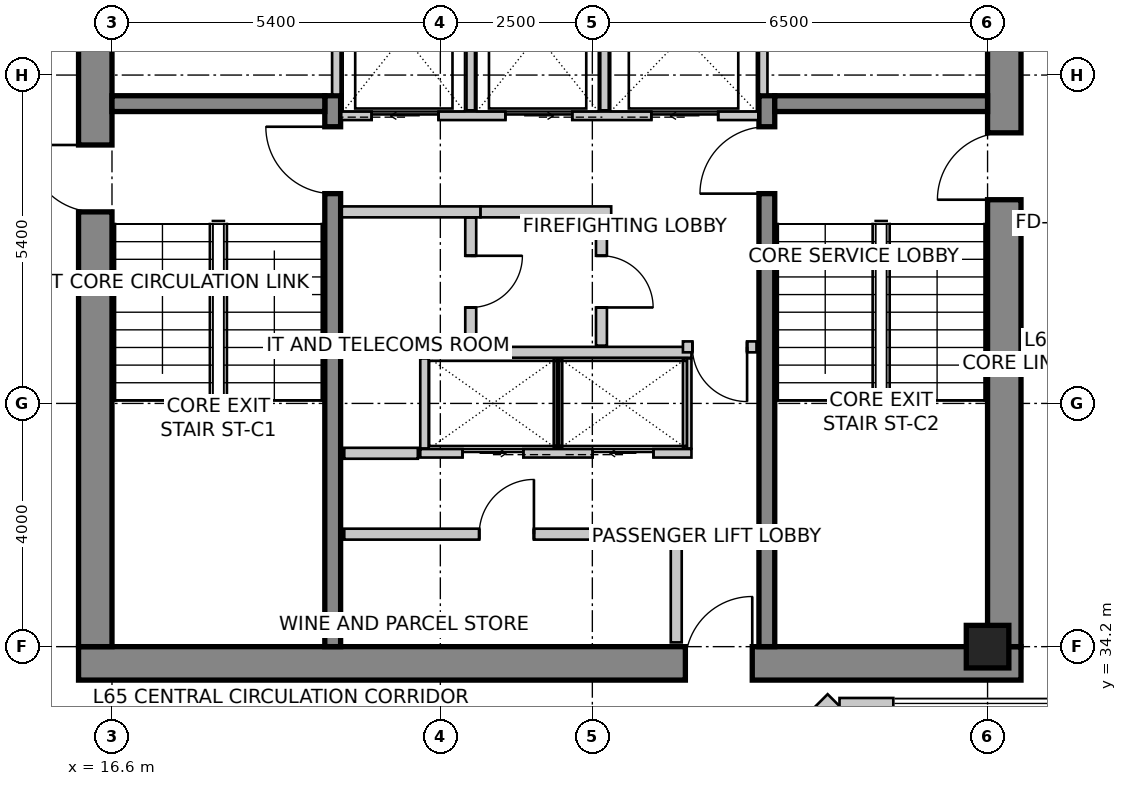
"""IFC4 building model, lengths in metres.
Left out: names, types, materials, properties, quantities, classifications, styles, units other than length and angle.
Written with IfcOpenShell. Run it as: python <this file> out.ifc"""

import sys

from ifc_helpers import new_model, si_unit, direction, frame, frame_2d, origin, origin_2d, place, context, subcontext, project, spatial, rectangle, extrude, source, transform, mapped, element, fill, save


model = new_model("IFC4")
c1 = context("Model", 3, precision=1e-05, world=origin(), true_north=direction((0.0, 1.0)))
c2 = subcontext(c1, "Body", "Model", "MODEL_VIEW")
j1 = project(units=[si_unit("LENGTHUNIT", "METRE"), si_unit("PLANEANGLEUNIT", "RADIAN")], contexts=[c1])
p1 = place(None, origin())
s1 = spatial("IfcSite", under=j1, at=p1, CompositionType="ELEMENT")
p2 = place(p1, origin())
s2 = spatial("IfcBuilding", under=s1, at=p2, CompositionType="ELEMENT")
p3 = place(p2, frame((0.0, 0.0, 256.5)))
s3 = spatial("IfcBuildingStorey", under=s2, at=p3, CompositionType="ELEMENT", Elevation=256.5)
p4 = place(p3, frame((16.05, 33.925, 0.0), z_axis=(0.0, 0.0, 1.0), x_axis=(1.0, 0.0, 0.0)))
e1 = element("IfcWall", 1, at=p4, inside=s3, PredefinedType="SHEAR", context=c2, shape_type="SweptSolid", body=[
    extrude(rectangle(XDim=15.5, YDim=0.55, at=frame_2d((7.75, 0.0))), origin(), (0.0, 0.0, 1.0), 3.6),
])
m1 = source(origin(), c2, "Body", "SweptSolid", [
    extrude(rectangle(XDim=1.1, YDim=2.15, at=frame_2d((0.55, 1.075))), frame((0.0, 0.285, 0.0), z_axis=(0.0, -1.0, 0.0), x_axis=(1.0, 0.0, 0.0)), (0.0, 0.0, 1.0), 0.57),
])
p5 = place(p4, frame((9.98, 0.0, 0.0)))
e2 = element("IfcOpeningElement", 2, at=p5, cuts=e1, PredefinedType="OPENING", context=c2, shape_type="MappedRepresentation", body=[
    mapped(m1, transform((0.0, 0.0, 0.0), scale=1.0)),
])
p6 = place(p3, frame((16.325, 34.2, 0.0), z_axis=(0.0, 0.0, 1.0), x_axis=(0.0, 1.0, 0.0)))
e3 = element("IfcWall", 3, at=p6, inside=s3, PredefinedType="SHEAR", context=c2, shape_type="SweptSolid", body=[
    extrude(rectangle(XDim=11.4, YDim=0.55, at=frame_2d((5.7, 0.0))), origin(), (0.0, 0.0, 1.0), 3.6),
])
p7 = place(p6, frame((7.15, 0.0, 0.0)))
e4 = element("IfcOpeningElement", 4, at=p7, cuts=e3, PredefinedType="OPENING", context=c2, shape_type="MappedRepresentation", body=[
    mapped(m1, transform((0.0, 0.0, 0.0), scale=1.0)),
])
p8 = place(p3, frame((31.275, 34.2, 0.0), z_axis=(0.0, 0.0, 1.0), x_axis=(0.0, 1.0, 0.0)))
e5 = element("IfcWall", 5, at=p8, inside=s3, PredefinedType="SHEAR", context=c2, shape_type="SweptSolid", body=[
    extrude(rectangle(XDim=11.4, YDim=0.55, at=frame_2d((5.7, 0.0))), origin(), (0.0, 0.0, 1.0), 3.6),
])
p9 = place(p8, frame((7.35, 0.0, 0.0)))
e6 = element("IfcOpeningElement", 6, at=p9, cuts=e5, PredefinedType="OPENING", context=c2, shape_type="MappedRepresentation", body=[
    mapped(m1, transform((0.0, 0.0, 0.0), scale=1.0)),
])
p10 = place(p3, frame((20.23, 34.2, 0.0), z_axis=(0.0, 0.0, 1.0), x_axis=(0.0, 1.0, 0.0)))
e7 = element("IfcWall", 7, at=p10, inside=s3, PredefinedType="SHEAR", context=c2, shape_type="SweptSolid", body=[
    extrude(rectangle(XDim=9.06, YDim=0.26, at=frame_2d((4.53, 0.0))), origin(), (0.0, 0.0, 1.0), 3.6),
])
m2 = source(origin(), c2, "Body", "SweptSolid", [
    extrude(rectangle(XDim=1.1, YDim=2.15, at=frame_2d((0.55, 1.075))), frame((0.0, 0.14, 0.0), z_axis=(0.0, -1.0, 0.0), x_axis=(1.0, 0.0, 0.0)), (0.0, 0.0, 1.0), 0.28),
])
p11 = place(p10, frame((7.45, 0.0, 0.0)))
e8 = element("IfcOpeningElement", 8, at=p11, cuts=e7, PredefinedType="OPENING", context=c2, shape_type="MappedRepresentation", body=[
    mapped(m2, transform((0.0, 0.0, 0.0), scale=1.0)),
])
p12 = place(p3, frame((27.37, 34.2, 0.0), z_axis=(0.0, 0.0, 1.0), x_axis=(0.0, 1.0, 0.0)))
e9 = element("IfcWall", 9, at=p12, inside=s3, PredefinedType="SHEAR", context=c2, shape_type="SweptSolid", body=[
    extrude(rectangle(XDim=9.06, YDim=0.26, at=frame_2d((4.53, 0.0))), origin(), (0.0, 0.0, 1.0), 3.6),
])
p13 = place(p12, frame((7.45, 0.0, 0.0)))
e10 = element("IfcOpeningElement", 10, at=p13, cuts=e9, PredefinedType="OPENING", context=c2, shape_type="MappedRepresentation", body=[
    mapped(m2, transform((0.0, 0.0, 0.0), scale=1.0)),
])
for number, where, z_axis, x_axis in (
    (11, (16.6, 43.13, 0.0), (0.0, 0.0, 1.0), (1.0, 0.0, 0.0)),
    (12, (27.5, 43.13, 0.0), (0.0, 0.0, 1.0), (1.0, 0.0, 0.0)),
):
    element("IfcWall", number, at=place(p3, frame(where, z_axis=z_axis, x_axis=x_axis)), inside=s3, PredefinedType="SHEAR", context=c2, shape_type="SweptSolid", body=[
        extrude(rectangle(XDim=3.5, YDim=0.26, at=frame_2d((1.75, 0.0))), origin(), (0.0, 0.0, 1.0), 3.6),
    ])
m3 = source(origin(), c2, "Body", "SweptSolid", [
    extrude(rectangle(XDim=0.7, YDim=0.7, at=origin_2d()), origin(), (0.0, 0.0, 1.0), 3.6),
])
p14 = place(p3, frame((31.0, 34.2, 0.0), z_axis=(0.0, 0.0, 1.0), x_axis=(1.0, 0.0, 0.0)))
e13 = element("IfcColumn", 13, at=p14, inside=s3, PredefinedType="COLUMN", context=c2, shape_type="MappedRepresentation", body=[
    mapped(m3, transform((0.0, 0.0, 0.0), scale=1.0)),
])
p15 = place(p3, frame((26.42, 31.256, 0.0), z_axis=(0.0, 0.0, 1.0), x_axis=(0.707106781187, 0.707106781187, 0.0)))
e14 = element("IfcWall", 14, at=p15, inside=s3, PredefinedType="SOLIDWALL", context=c2, shape_type="SweptSolid", body=[
    extrude(rectangle(XDim=2.907, YDim=0.3, at=frame_2d((1.454, 0.0))), origin(), (0.0, 0.0, 1.0), 3.35),
])
m4 = source(origin(), c2, "Body", "SweptSolid", [
    extrude(rectangle(XDim=2.1, YDim=2.0, at=frame_2d((1.05, 1.0))), frame((0.0, 0.16, 0.0), z_axis=(0.0, -1.0, 0.0), x_axis=(1.0, 0.0, 0.0)), (0.0, 0.0, 1.0), 0.32),
])
p16 = place(p15, frame((0.404, 0.0, 0.85)))
e15 = element("IfcOpeningElement", 15, at=p16, cuts=e14, PredefinedType="OPENING", context=c2, shape_type="MappedRepresentation", body=[
    mapped(m4, transform((0.0, 0.0, 0.0), scale=1.0)),
])
p17 = place(p3, frame((28.565, 33.206, 0.0), z_axis=(0.0, 0.0, 1.0), x_axis=(1.0, 0.0, 0.0)))
e16 = element("IfcWall", 16, at=p17, inside=s3, PredefinedType="SOLIDWALL", context=c2, shape_type="SweptSolid", body=[
    extrude(rectangle(XDim=0.885, YDim=0.3, at=frame_2d((0.442, 0.0))), origin(), (0.0, 0.0, 1.0), 3.35),
])
p18 = place(p3, frame((20.37, 42.93, 0.0), z_axis=(0.0, 0.0, 1.0), x_axis=(1.0, 0.0, 0.0)))
e17 = element("IfcWall", 17, at=p18, inside=s3, PredefinedType="SOLIDWALL", context=c2, shape_type="SweptSolid", body=[
    extrude(rectangle(XDim=6.86, YDim=0.14, at=frame_2d((3.43, 0.0))), origin(), (0.0, 0.0, 1.0), 3.35),
])
m5 = source(origin(), c2, "Body", "SweptSolid", [
    extrude(rectangle(XDim=1.1, YDim=2.15, at=frame_2d((0.55, 1.075))), frame((0.0, 0.08, 0.0), z_axis=(0.0, -1.0, 0.0), x_axis=(1.0, 0.0, 0.0)), (0.0, 0.0, 1.0), 0.16),
])
p19 = place(p18, frame((0.5, 0.0, 0.0)))
e18 = element("IfcOpeningElement", 18, at=p19, cuts=e17, PredefinedType="OPENING", context=c2, shape_type="MappedRepresentation", body=[
    mapped(m5, transform((0.0, 0.0, 0.0), scale=1.0)),
])
p20 = place(p18, frame((2.7, 0.0, 0.0)))
e19 = element("IfcOpeningElement", 19, at=p20, cuts=e17, PredefinedType="OPENING", context=c2, shape_type="MappedRepresentation", body=[
    mapped(m5, transform((0.0, 0.0, 0.0), scale=1.0)),
])
p21 = place(p18, frame((5.1, 0.0, 0.0)))
e20 = element("IfcOpeningElement", 20, at=p21, cuts=e17, PredefinedType="OPENING", context=c2, shape_type="MappedRepresentation", body=[
    mapped(m5, transform((0.0, 0.0, 0.0), scale=1.0)),
])
for number, where, z_axis, x_axis in (
    (21, (20.29, 43.28, 0.0), (0.0, 0.0, 1.0), (0.0, 1.0, 0.0)),
    (22, (27.31, 43.28, 0.0), (0.0, 0.0, 1.0), (0.0, 1.0, 0.0)),
):
    element("IfcWall", number, at=place(p3, frame(where, z_axis=z_axis, x_axis=x_axis)), inside=s3, PredefinedType="SOLIDWALL", context=c2, shape_type="SweptSolid", body=[
        extrude(rectangle(XDim=2.3, YDim=0.14, at=frame_2d((1.15, 0.0))), origin(), (0.0, 0.0, 1.0), 3.35),
    ])
for number, where, z_axis, x_axis in (
    (23, (22.5, 43.02, 0.0), (0.0, 0.0, 1.0), (0.0, 1.0, 0.0)),
    (24, (24.7, 43.02, 0.0), (0.0, 0.0, 1.0), (0.0, 1.0, 0.0)),
):
    element("IfcWall", number, at=place(p3, frame(where, z_axis=z_axis, x_axis=x_axis)), inside=s3, PredefinedType="SOLIDWALL", context=c2, shape_type="SweptSolid", body=[
        extrude(rectangle(XDim=2.56, YDim=0.14, at=frame_2d((1.28, 0.0))), origin(), (0.0, 0.0, 1.0), 3.35),
    ])
p22 = place(p3, frame((21.67, 37.38, 0.0), z_axis=(0.0, 0.0, 1.0), x_axis=(1.0, 0.0, 0.0)))
e25 = element("IfcWall", 25, at=p22, inside=s3, PredefinedType="SOLIDWALL", context=c2, shape_type="SweptSolid", body=[
    extrude(rectangle(XDim=4.46, YDim=0.14, at=frame_2d((2.23, 0.0))), origin(), (0.0, 0.0, 1.0), 3.35),
])
m6 = source(origin(), c2, "Body", "SweptSolid", [
    extrude(rectangle(XDim=1.0, YDim=2.15, at=frame_2d((0.5, 1.075))), frame((0.0, 0.08, 0.0), z_axis=(0.0, -1.0, 0.0), x_axis=(1.0, 0.0, 0.0)), (0.0, 0.0, 1.0), 0.16),
])
p23 = place(p22, frame((0.695, 0.0, 0.0)))
e26 = element("IfcOpeningElement", 26, at=p23, cuts=e25, PredefinedType="OPENING", context=c2, shape_type="MappedRepresentation", body=[
    mapped(m6, transform((0.0, 0.0, 0.0), scale=1.0)),
])
p24 = place(p22, frame((2.835, 0.0, 0.0)))
e27 = element("IfcOpeningElement", 27, at=p24, cuts=e25, PredefinedType="OPENING", context=c2, shape_type="MappedRepresentation", body=[
    mapped(m6, transform((0.0, 0.0, 0.0), scale=1.0)),
])
p25 = place(p3, frame((21.67, 39.04, 0.0), z_axis=(0.0, 0.0, 1.0), x_axis=(1.0, 0.0, 0.0)))
e28 = element("IfcWall", 28, at=p25, inside=s3, PredefinedType="SOLIDWALL", context=c2, shape_type="SweptSolid", body=[
    extrude(rectangle(XDim=4.46, YDim=0.18, at=frame_2d((2.23, 0.0))), origin(), (0.0, 0.0, 1.0), 3.35),
])
for number, where, z_axis, x_axis in (
    (29, (26.06, 37.46, 0.0), (0.0, 0.0, 1.0), (0.0, 1.0, 0.0)),
    (30, (21.74, 37.46, 0.0), (0.0, 0.0, 1.0), (0.0, 1.0, 0.0)),
    (31, (23.935, 37.46, 0.0), (0.0, 0.0, 1.0), (0.0, 1.0, 0.0)),
):
    element("IfcWall", number, at=place(p3, frame(where, z_axis=z_axis, x_axis=x_axis)), inside=s3, PredefinedType="SOLIDWALL", context=c2, shape_type="SweptSolid", body=[
        extrude(rectangle(XDim=1.48, YDim=0.14, at=frame_2d((0.74, 0.0))), origin(), (0.0, 0.0, 1.0), 3.35),
    ])
p26 = place(p3, frame((22.66, 41.35, 0.0), z_axis=(0.0, 0.0, 1.0), x_axis=(-1.0, 0.0, 0.0)))
e32 = element("IfcWall", 32, at=p26, inside=s3, PredefinedType="PARTITIONING", context=c2, shape_type="SweptSolid", body=[
    extrude(rectangle(XDim=2.28, YDim=0.18, at=frame_2d((1.14, 0.0))), origin(), (0.0, 0.0, 1.0), 3.35),
])
p27 = place(p3, frame((24.81, 41.35, 0.0), z_axis=(0.0, 0.0, 1.0), x_axis=(-1.0, 0.0, 0.0)))
e33 = element("IfcWall", 33, at=p27, inside=s3, PredefinedType="PARTITIONING", context=c2, shape_type="SweptSolid", body=[
    extrude(rectangle(XDim=2.148, YDim=0.18, at=frame_2d((1.074, 0.0))), origin(), (0.0, 0.0, 1.0), 3.35),
])
p28 = place(p3, frame((22.5, 41.256, 0.0), z_axis=(0.0, 0.0, 1.0), x_axis=(0.0, -1.0, 0.0)))
e34 = element("IfcWall", 34, at=p28, inside=s3, PredefinedType="PARTITIONING", context=c2, shape_type="SweptSolid", body=[
    extrude(rectangle(XDim=2.106, YDim=0.18, at=frame_2d((1.053, 0.0))), origin(), (0.0, 0.0, 1.0), 3.35),
])
m7 = source(origin(), c2, "Body", "SweptSolid", [
    extrude(rectangle(XDim=0.85, YDim=2.15, at=frame_2d((0.425, 1.075))), frame((0.0, 0.1, 0.0), z_axis=(0.0, -1.0, 0.0), x_axis=(1.0, 0.0, 0.0)), (0.0, 0.0, 1.0), 0.2),
])
p29 = place(p28, frame((0.628, 0.0, 0.0)))
e35 = element("IfcOpeningElement", 35, at=p29, cuts=e34, PredefinedType="OPENING", context=c2, shape_type="MappedRepresentation", body=[
    mapped(m7, transform((0.0, 0.0, 0.0), scale=1.0)),
])
p30 = place(p3, frame((21.63, 37.38, 0.0), z_axis=(0.0, 0.0, 1.0), x_axis=(-1.0, 0.0, 0.0)))
e36 = element("IfcWall", 36, at=p30, inside=s3, PredefinedType="PARTITIONING", context=c2, shape_type="SweptSolid", body=[
    extrude(rectangle(XDim=1.21, YDim=0.18, at=frame_2d((0.605, 0.0))), origin(), (0.0, 0.0, 1.0), 3.35),
])
p31 = place(p3, frame((24.65, 41.256, 0.0), z_axis=(0.0, 0.0, 1.0), x_axis=(0.0, -1.0, 0.0)))
e37 = element("IfcWall", 37, at=p31, inside=s3, PredefinedType="PARTITIONING", context=c2, shape_type="SweptSolid", body=[
    extrude(rectangle(XDim=2.106, YDim=0.18, at=frame_2d((1.053, 0.0))), origin(), (0.0, 0.0, 1.0), 3.35),
])
p32 = place(p31, frame((0.628, 0.0, 0.0)))
e38 = element("IfcOpeningElement", 38, at=p32, cuts=e37, PredefinedType="OPENING", context=c2, shape_type="MappedRepresentation", body=[
    mapped(m7, transform((0.0, 0.0, 0.0), scale=1.0)),
])
p33 = place(p3, frame((27.2, 39.13, 0.0), z_axis=(0.0, 0.0, 1.0), x_axis=(-1.0, 0.0, 0.0)))
e39 = element("IfcWall", 39, at=p33, inside=s3, PredefinedType="PARTITIONING", context=c2, shape_type="SweptSolid", body=[
    extrude(rectangle(XDim=1.21, YDim=0.18, at=frame_2d((0.605, 0.0))), origin(), (0.0, 0.0, 1.0), 3.35),
])
m8 = source(origin(), c2, "Body", "SweptSolid", [
    extrude(rectangle(XDim=0.9, YDim=2.15, at=frame_2d((0.45, 1.075))), frame((0.0, 0.1, 0.0), z_axis=(0.0, -1.0, 0.0), x_axis=(1.0, 0.0, 0.0)), (0.0, 0.0, 1.0), 0.2),
])
p34 = place(p33, frame((0.155, 0.0, 0.0)))
e40 = element("IfcOpeningElement", 40, at=p34, cuts=e39, PredefinedType="OPENING", context=c2, shape_type="MappedRepresentation", body=[
    mapped(m8, transform((0.0, 0.0, 0.0), scale=1.0)),
])
p35 = place(p3, frame((20.42, 36.05, 0.0), z_axis=(0.0, 0.0, 1.0), x_axis=(1.0, 0.0, 0.0)))
e41 = element("IfcWall", 41, at=p35, inside=s3, PredefinedType="PARTITIONING", context=c2, shape_type="SweptSolid", body=[
    extrude(rectangle(XDim=5.46, YDim=0.18, at=frame_2d((2.73, 0.0))), origin(), (0.0, 0.0, 1.0), 3.35),
])
p36 = place(p35, frame((2.219, 0.0, 0.0)))
e42 = element("IfcOpeningElement", 42, at=p36, cuts=e41, PredefinedType="OPENING", context=c2, shape_type="MappedRepresentation", body=[
    mapped(m8, transform((0.0, 0.0, 0.0), scale=1.0)),
])
p37 = place(p3, frame((25.88, 35.956, 0.0), z_axis=(0.0, 0.0, 1.0), x_axis=(0.0, -1.0, 0.0)))
e43 = element("IfcWall", 43, at=p37, inside=s3, PredefinedType="PARTITIONING", context=c2, shape_type="SweptSolid", body=[
    extrude(rectangle(XDim=1.686, YDim=0.18, at=frame_2d((0.843, 0.0))), origin(), (0.0, 0.0, 1.0), 2.642),
])
m9 = source(origin(), c2, "Body", "SweptSolid", [
    extrude(rectangle(XDim=1.1, YDim=2.15, at=frame_2d((0.55, 1.075))), frame((0.0, 0.025, 0.0), z_axis=(0.0, -1.0, 0.0), x_axis=(1.0, 0.0, 0.0)), (0.0, 0.0, 1.0), 0.05),
])
p38 = place(p19, origin())
e44 = element("IfcDoor", 44, at=p38, inside=s3, OperationType="SLIDING_TO_LEFT", PredefinedType="DOOR", context=c2, shape_type="MappedRepresentation", body=[
    mapped(m9, transform((0.0, 0.0, 0.0), scale=1.0)),
])
fill(e18, e44)
p39 = place(p20, origin())
e45 = element("IfcDoor", 45, at=p39, inside=s3, OperationType="SLIDING_TO_RIGHT", PredefinedType="DOOR", context=c2, shape_type="MappedRepresentation", body=[
    mapped(m9, transform((0.0, 0.0, 0.0), scale=1.0)),
])
fill(e19, e45)
m10 = source(origin(), c2, "Body", "SweptSolid", [
    extrude(rectangle(XDim=1.1, YDim=2.15, at=frame_2d((0.55, 1.075))), frame((0.0, 0.025, 0.0), z_axis=(0.0, -1.0, 0.0), x_axis=(1.0, 0.0, 0.0)), (0.0, 0.0, 1.0), 0.05),
])
p40 = place(p21, origin())
e46 = element("IfcDoor", 46, at=p40, inside=s3, OperationType="SLIDING_TO_LEFT", PredefinedType="DOOR", context=c2, shape_type="MappedRepresentation", body=[
    mapped(m10, transform((0.0, 0.0, 0.0), scale=1.0)),
])
fill(e20, e46)
m11 = source(origin(), c2, "Body", "SweptSolid", [
    extrude(rectangle(XDim=1.0, YDim=2.15, at=frame_2d((0.5, 1.075))), frame((0.0, 0.025, 0.0), z_axis=(0.0, -1.0, 0.0), x_axis=(1.0, 0.0, 0.0)), (0.0, 0.0, 1.0), 0.05),
])
p41 = place(p23, origin())
e47 = element("IfcDoor", 47, at=p41, inside=s3, OperationType="SLIDING_TO_RIGHT", PredefinedType="DOOR", context=c2, shape_type="MappedRepresentation", body=[
    mapped(m11, transform((0.0, 0.0, 0.0), scale=1.0)),
])
fill(e26, e47)
p42 = place(p24, origin())
e48 = element("IfcDoor", 48, at=p42, inside=s3, OperationType="SLIDING_TO_LEFT", PredefinedType="DOOR", context=c2, shape_type="MappedRepresentation", body=[
    mapped(m11, transform((0.0, 0.0, 0.0), scale=1.0)),
])
fill(e27, e48)
m12 = source(origin(), c2, "Body", "SweptSolid", [
    extrude(rectangle(XDim=1.1, YDim=2.15, at=frame_2d((0.55, 1.075))), frame((0.0, 0.025, 0.0), z_axis=(0.0, -1.0, 0.0), x_axis=(1.0, 0.0, 0.0)), (0.0, 0.0, 1.0), 0.05),
])
p43 = place(p11, origin())
e49 = element("IfcDoor", 49, at=p43, inside=s3, OperationType="SINGLE_SWING_RIGHT", PredefinedType="DOOR", context=c2, shape_type="MappedRepresentation", body=[
    mapped(m12, transform((0.0, 0.0, 0.0), scale=1.0)),
])
fill(e8, e49)
p44 = place(p13, origin())
e50 = element("IfcDoor", 50, at=p44, inside=s3, OperationType="SINGLE_SWING_LEFT", PredefinedType="DOOR", context=c2, shape_type="MappedRepresentation", body=[
    mapped(m12, transform((0.0, 0.0, 0.0), scale=1.0)),
])
fill(e10, e50)
p45 = place(p7, origin())
e51 = element("IfcDoor", 51, at=p45, inside=s3, OperationType="SINGLE_SWING_RIGHT", PredefinedType="DOOR", context=c2, shape_type="MappedRepresentation", body=[
    mapped(m12, transform((0.0, 0.0, 0.0), scale=1.0)),
])
fill(e4, e51)
p46 = place(p9, origin())
e52 = element("IfcDoor", 52, at=p46, inside=s3, OperationType="SINGLE_SWING_LEFT", PredefinedType="DOOR", context=c2, shape_type="MappedRepresentation", body=[
    mapped(m12, transform((0.0, 0.0, 0.0), scale=1.0)),
])
fill(e6, e52)
p47 = place(p5, origin())
e53 = element("IfcDoor", 53, at=p47, inside=s3, OperationType="SINGLE_SWING_RIGHT", PredefinedType="DOOR", context=c2, shape_type="MappedRepresentation", body=[
    mapped(m12, transform((0.0, 0.0, 0.0), scale=1.0)),
])
fill(e2, e53)
m13 = source(origin(), c2, "Body", "SweptSolid", [
    extrude(rectangle(XDim=0.85, YDim=2.15, at=frame_2d((0.425, 1.075))), frame((0.0, 0.025, 0.0), z_axis=(0.0, -1.0, 0.0), x_axis=(1.0, 0.0, 0.0)), (0.0, 0.0, 1.0), 0.05),
])
p48 = place(p29, origin())
e54 = element("IfcDoor", 54, at=p48, inside=s3, OperationType="SINGLE_SWING_LEFT", PredefinedType="DOOR", context=c2, shape_type="MappedRepresentation", body=[
    mapped(m13, transform((0.0, 0.0, 0.0), scale=1.0)),
])
fill(e35, e54)
p49 = place(p32, origin())
e55 = element("IfcDoor", 55, at=p49, inside=s3, OperationType="SINGLE_SWING_RIGHT", PredefinedType="DOOR", context=c2, shape_type="MappedRepresentation", body=[
    mapped(m13, transform((0.0, 0.0, 0.0), scale=1.0)),
])
fill(e38, e55)
m14 = source(origin(), c2, "Body", "SweptSolid", [
    extrude(rectangle(XDim=0.9, YDim=2.15, at=frame_2d((0.45, 1.075))), frame((0.0, 0.025, 0.0), z_axis=(0.0, -1.0, 0.0), x_axis=(1.0, 0.0, 0.0)), (0.0, 0.0, 1.0), 0.05),
])
p50 = place(p34, origin())
e56 = element("IfcDoor", 56, at=p50, inside=s3, OperationType="SINGLE_SWING_LEFT", PredefinedType="DOOR", context=c2, shape_type="MappedRepresentation", body=[
    mapped(m14, transform((0.0, 0.0, 0.0), scale=1.0)),
])
fill(e40, e56)
p51 = place(p36, origin())
e57 = element("IfcDoor", 57, at=p51, inside=s3, OperationType="SINGLE_SWING_RIGHT", PredefinedType="DOOR", context=c2, shape_type="MappedRepresentation", body=[
    mapped(m14, transform((0.0, 0.0, 0.0), scale=1.0)),
])
fill(e42, e57)
save(model, sys.argv[1])
